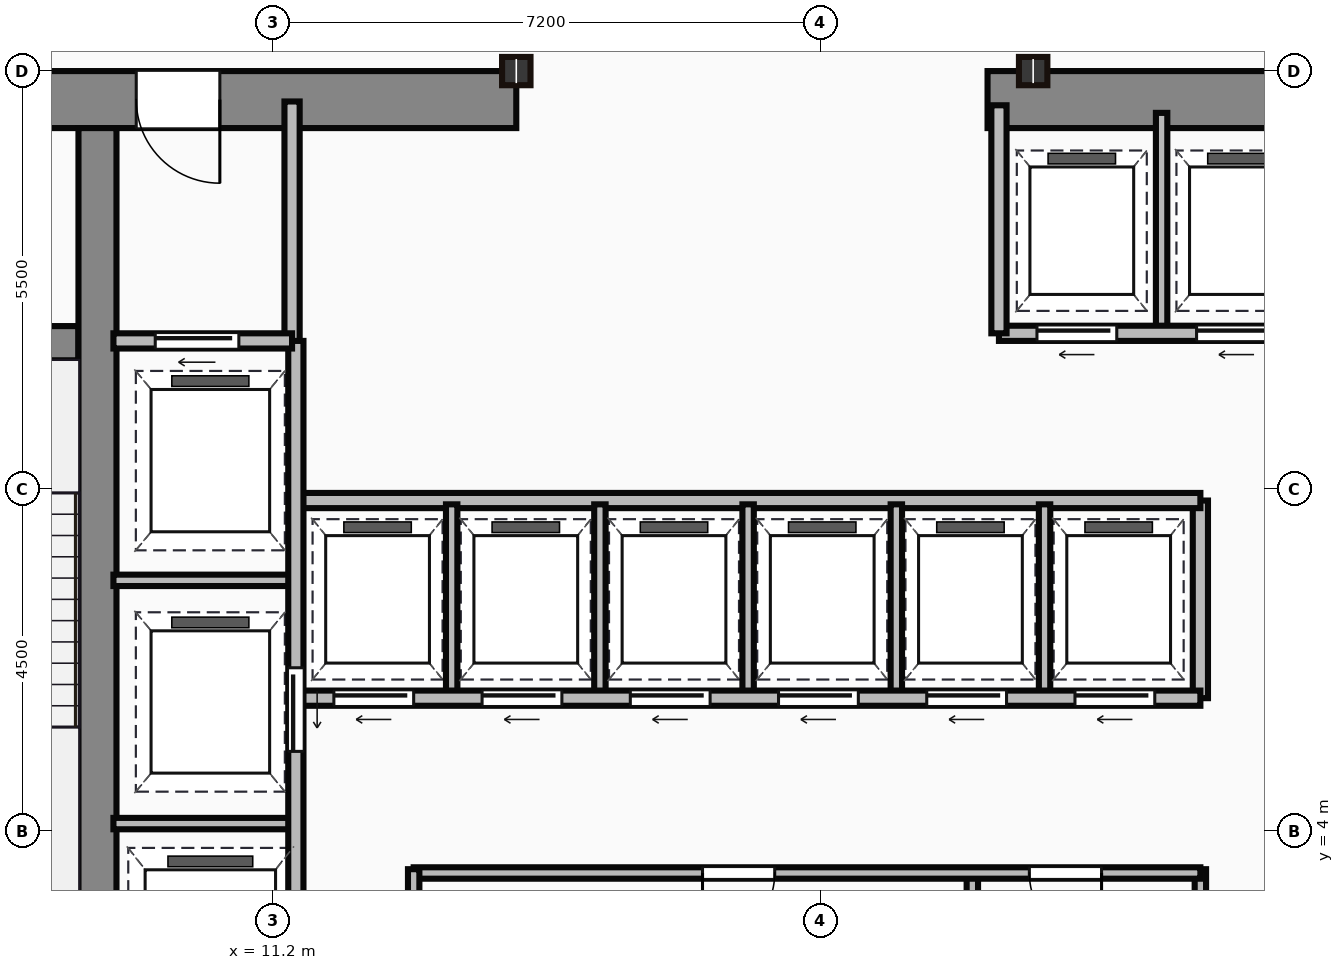
"""IFC4 building model, lengths in metres.
Left out: names, types, materials, properties, quantities, classifications, styles, units other than length and angle.
Written with IfcOpenShell. Run it as: python <this file> out.ifc"""

import sys

from ifc_helpers import new_model, si_unit, direction, frame, frame_2d, origin, origin_2d, place, context, subcontext, project, spatial, rectangle, i_section, extrude, source, transform, mapped, element, fill, save


model = new_model("IFC4")
c1 = context("Model", 3, precision=1e-05, world=origin(), true_north=direction((0.0, 1.0)))
c2 = subcontext(c1, "Body", "Model", "MODEL_VIEW")
j1 = project(units=[si_unit("LENGTHUNIT", "METRE"), si_unit("PLANEANGLEUNIT", "RADIAN")], contexts=[c1])
p1 = place(None, origin())
s1 = spatial("IfcSite", under=j1, at=p1, CompositionType="ELEMENT")
p2 = place(p1, origin())
s2 = spatial("IfcBuilding", under=s1, at=p2, CompositionType="ELEMENT")
p3 = place(p2, frame((0.0, 0.0, 184.4)))
s3 = spatial("IfcBuildingStorey", under=s2, at=p3, CompositionType="ELEMENT", Elevation=184.4)
m1 = source(origin(), c2, "Body", "SweptSolid", [
    extrude(rectangle(XDim=9.1, YDim=0.75, at=frame_2d((4.55, 0.0))), origin(), (0.0, 0.0, 1.0), 4.2),
])
p4 = place(p3, frame((5.3, 13.625, 0.0), z_axis=(0.0, 0.0, 1.0), x_axis=(1.0, 0.0, 0.0)))
e1 = element("IfcWall", 1, at=p4, inside=s3, PredefinedType="SHEAR", context=c2, shape_type="MappedRepresentation", body=[
    mapped(m1, transform((0.0, 0.0, 0.0))),
])
p5 = place(p4, frame((4.1, 0.0, 0.0)))
e2 = element("IfcOpeningElement", 2, at=p5, cuts=e1, PredefinedType="OPENING", context=c2, shape_type="SweptSolid", body=[
    extrude(rectangle(XDim=1.1, YDim=2.15, at=frame_2d((0.55, 1.075))), frame((0.0, 0.385, 0.0), z_axis=(0.0, -1.0, 0.0), x_axis=(1.0, 0.0, 0.0)), (0.0, 0.0, 1.0), 0.77),
])
m2 = source(origin(), c2, "Body", "SweptSolid", [
    extrude(rectangle(XDim=12.6, YDim=0.75, at=frame_2d((6.3, 0.0))), origin(), (0.0, 0.0, 1.0), 4.2),
])
p6 = place(p3, frame((20.6, 13.625, 0.0), z_axis=(0.0, 0.0, 1.0), x_axis=(1.0, 0.0, 0.0)))
e3 = element("IfcWall", 3, at=p6, inside=s3, PredefinedType="SHEAR", context=c2, shape_type="MappedRepresentation", body=[
    mapped(m2, transform((0.0, 0.0, 0.0))),
])
p7 = place(p6, frame((9.25, 0.0, 0.0)))
e4 = element("IfcOpeningElement", 4, at=p7, cuts=e3, PredefinedType="OPENING", context=c2, shape_type="SweptSolid", body=[
    extrude(rectangle(XDim=1.1, YDim=2.15, at=frame_2d((0.55, 1.075))), frame((0.0, 0.385, 0.0), z_axis=(0.0, -1.0, 0.0), x_axis=(1.0, 0.0, 0.0)), (0.0, 0.0, 1.0), 0.77),
])
m3 = source(origin(), c2, "Body", "SweptSolid", [
    extrude(rectangle(XDim=12.35, YDim=0.5, at=frame_2d((6.175, 0.0))), origin(), (0.0, 0.0, 1.0), 4.2),
])
p8 = place(p3, frame((8.89, 0.9, 0.0), z_axis=(0.0, 0.0, 1.0), x_axis=(0.0, 1.0, 0.0)))
e5 = element("IfcWall", 5, at=p8, inside=s3, PredefinedType="SHEAR", context=c2, shape_type="MappedRepresentation", body=[
    mapped(m3, transform((0.0, 0.0, 0.0))),
])
m4 = source(origin(), c2, "Body", "SweptSolid", [
    extrude(rectangle(XDim=3.39, YDim=0.45, at=frame_2d((1.695, 0.0))), origin(), (0.0, 0.0, 1.0), 4.2),
])
p9 = place(p3, frame((5.25, 10.42, 0.0), z_axis=(0.0, 0.0, 1.0), x_axis=(1.0, 0.0, 0.0)))
e6 = element("IfcWall", 6, at=p9, inside=s3, PredefinedType="SHEAR", context=c2, shape_type="MappedRepresentation", body=[
    mapped(m4, transform((0.0, 0.0, 0.0))),
])
p10 = place(p9, frame((1.05, 0.0, 0.0)))
e7 = element("IfcOpeningElement", 7, at=p10, cuts=e6, PredefinedType="OPENING", context=c2, shape_type="SweptSolid", body=[
    extrude(rectangle(XDim=1.1, YDim=2.15, at=frame_2d((0.55, 1.075))), frame((0.0, 0.235, 0.0), z_axis=(0.0, -1.0, 0.0), x_axis=(1.0, 0.0, 0.0)), (0.0, 0.0, 1.0), 0.47),
])
m5 = source(origin(), c2, "Body", "SweptSolid", [
    extrude(i_section(OverallWidth=0.374, OverallDepth=0.372, WebThickness=0.016, FlangeThickness=0.026, at=origin_2d()), origin(), (0.0, 0.0, 1.0), 4.2),
])
for number, where, z_axis, x_axis in (
    (8, (14.4, 14.0, 0.0), (0.0, 0.0, 1.0), (1.0, 0.0, 0.0)),
    (9, (21.2, 14.0, 0.0), (0.0, 0.0, 1.0), (1.0, 0.0, 0.0)),
):
    element("IfcColumn", number, at=place(p3, frame(where, z_axis=z_axis, x_axis=x_axis)), inside=s3, PredefinedType="COLUMN", context=c2, shape_type="MappedRepresentation", body=[
        mapped(m5, transform((0.0, 0.0, 0.0))),
    ])
m6 = source(origin(), c2, "Body", "SweptSolid", [
    extrude(rectangle(XDim=3.18, YDim=0.2, at=frame_2d((1.59, 0.0))), origin(), (0.0, 0.0, 1.0), 3.95),
])
p11 = place(p3, frame((11.45, 10.42, 0.0), z_axis=(0.0, 0.0, 1.0), x_axis=(0.0, 1.0, 0.0)))
e10 = element("IfcWall", 10, at=p11, inside=s3, PredefinedType="PARTITIONING", context=c2, shape_type="MappedRepresentation", body=[
    mapped(m6, transform((0.0, 0.0, 0.0))),
])
m7 = source(origin(), c2, "Body", "SweptSolid", [
    extrude(rectangle(XDim=2.35, YDim=0.2, at=frame_2d((1.175, 0.0))), origin(), (0.0, 0.0, 1.0), 3.95),
])
p12 = place(p3, frame((9.1, 10.45, 0.0), z_axis=(0.0, 0.0, 1.0), x_axis=(1.0, 0.0, 0.0)))
e11 = element("IfcWall", 11, at=p12, inside=s3, PredefinedType="PARTITIONING", context=c2, shape_type="MappedRepresentation", body=[
    mapped(m7, transform((0.0, 0.0, 0.0))),
])
p13 = place(p12, frame((0.55, 0.0, 0.0)))
e12 = element("IfcOpeningElement", 12, at=p13, cuts=e11, PredefinedType="OPENING", context=c2, shape_type="SweptSolid", body=[
    extrude(rectangle(XDim=1.1, YDim=2.15, at=frame_2d((0.55, 1.075))), frame((0.0, 0.11, 0.0), z_axis=(0.0, -1.0, 0.0), x_axis=(1.0, 0.0, 0.0)), (0.0, 0.0, 1.0), 0.22),
])
m8 = source(origin(), c2, "Body", "SweptSolid", [
    extrude(rectangle(XDim=9.6, YDim=0.2, at=frame_2d((4.8, 0.0))), origin(), (0.0, 0.0, 1.0), 3.95),
])
p14 = place(p3, frame((11.5, 0.85, 0.0), z_axis=(0.0, 0.0, 1.0), x_axis=(0.0, 1.0, 0.0)))
e13 = element("IfcWall", 13, at=p14, inside=s3, PredefinedType="PARTITIONING", context=c2, shape_type="MappedRepresentation", body=[
    mapped(m8, transform((0.0, 0.0, 0.0))),
])
p15 = place(p14, frame((4.2, 0.0, 0.0)))
e14 = element("IfcOpeningElement", 14, at=p15, cuts=e13, PredefinedType="OPENING", context=c2, shape_type="SweptSolid", body=[
    extrude(rectangle(XDim=1.1, YDim=2.15, at=frame_2d((0.55, 1.075))), frame((0.0, 0.11, 0.0), z_axis=(0.0, -1.0, 0.0), x_axis=(1.0, 0.0, 0.0)), (0.0, 0.0, 1.0), 0.22),
])
p16 = place(p14, frame((0.9, 0.0, 0.0)))
e15 = element("IfcOpeningElement", 15, at=p16, cuts=e13, PredefinedType="OPENING", context=c2, shape_type="SweptSolid", body=[
    extrude(rectangle(XDim=1.2, YDim=2.15, at=frame_2d((0.6, 1.075))), frame((0.0, 0.11, 0.0), z_axis=(0.0, -1.0, 0.0), x_axis=(1.0, 0.0, 0.0)), (0.0, 0.0, 1.0), 0.22),
])
m9 = source(origin(), c2, "Body", "SweptSolid", [
    extrude(rectangle(XDim=2.4, YDim=0.15, at=frame_2d((1.2, 0.0))), origin(), (0.0, 0.0, 1.0), 3.95),
])
for number, where, z_axis, x_axis in (
    (16, (9.1, 4.1, 0.0), (0.0, 0.0, 1.0), (1.0, 0.0, 0.0)),
    (17, (9.1, 7.3, 0.0), (0.0, 0.0, 1.0), (1.0, 0.0, 0.0)),
):
    element("IfcWall", number, at=place(p3, frame(where, z_axis=z_axis, x_axis=x_axis)), inside=s3, PredefinedType="PARTITIONING", context=c2, shape_type="MappedRepresentation", body=[
        mapped(m9, transform((0.0, 0.0, 0.0))),
    ])
m10 = source(origin(), c2, "Body", "SweptSolid", [
    extrude(rectangle(XDim=2.65, YDim=0.15, at=frame_2d((1.325, 0.0))), origin(), (0.0, 0.0, 1.0), 3.95),
])
p17 = place(p3, frame((13.05, 0.85, 0.0), z_axis=(0.0, 0.0, 1.0), x_axis=(0.0, 1.0, 0.0)))
e18 = element("IfcWall", 18, at=p17, inside=s3, PredefinedType="PARTITIONING", context=c2, shape_type="MappedRepresentation", body=[
    mapped(m10, transform((0.0, 0.0, 0.0))),
])
m11 = source(origin(), c2, "Body", "SweptSolid", [
    extrude(rectangle(XDim=10.35, YDim=0.15, at=frame_2d((5.175, 0.0))), origin(), (0.0, 0.0, 1.0), 3.95),
])
p18 = place(p3, frame((13.05, 3.45, 0.0), z_axis=(0.0, 0.0, 1.0), x_axis=(1.0, 0.0, 0.0)))
e19 = element("IfcWall", 19, at=p18, inside=s3, PredefinedType="PARTITIONING", context=c2, shape_type="MappedRepresentation", body=[
    mapped(m11, transform((0.0, 0.0, 0.0))),
])
p19 = place(p18, frame((3.8, 0.0, 0.0)))
e20 = element("IfcOpeningElement", 20, at=p19, cuts=e19, PredefinedType="OPENING", context=c2, shape_type="SweptSolid", body=[
    extrude(rectangle(XDim=0.95, YDim=2.15, at=frame_2d((0.475, 1.075))), frame((0.0, 0.085, 0.0), z_axis=(0.0, -1.0, 0.0), x_axis=(1.0, 0.0, 0.0)), (0.0, 0.0, 1.0), 0.17),
])
p20 = place(p18, frame((8.1, 0.0, 0.0)))
e21 = element("IfcOpeningElement", 21, at=p20, cuts=e19, PredefinedType="OPENING", context=c2, shape_type="SweptSolid", body=[
    extrude(rectangle(XDim=0.95, YDim=2.15, at=frame_2d((0.475, 1.075))), frame((0.0, 0.085, 0.0), z_axis=(0.0, -1.0, 0.0), x_axis=(1.0, 0.0, 0.0)), (0.0, 0.0, 1.0), 0.17),
])
p21 = place(p3, frame((23.4, 0.85, 0.0), z_axis=(0.0, 0.0, 1.0), x_axis=(0.0, 1.0, 0.0)))
e22 = element("IfcWall", 22, at=p21, inside=s3, PredefinedType="PARTITIONING", context=c2, shape_type="MappedRepresentation", body=[
    mapped(m10, transform((0.0, 0.0, 0.0))),
])
m12 = source(origin(), c2, "Body", "SweptSolid", [
    extrude(rectangle(XDim=2.6, YDim=0.15, at=frame_2d((1.3, 0.0))), origin(), (0.0, 0.0, 1.0), 3.95),
])
p22 = place(p3, frame((20.4, 0.85, 0.0), z_axis=(0.0, 0.0, 1.0), x_axis=(0.0, 1.0, 0.0)))
e23 = element("IfcWall", 23, at=p22, inside=s3, PredefinedType="PARTITIONING", context=c2, shape_type="MappedRepresentation", body=[
    mapped(m12, transform((0.0, 0.0, 0.0))),
])
m13 = source(origin(), c2, "Body", "SweptSolid", [
    extrude(rectangle(XDim=11.85, YDim=0.2, at=frame_2d((5.925, 0.0))), origin(), (0.0, 0.0, 1.0), 3.95),
])
p23 = place(p3, frame((11.55, 5.75, 0.0), z_axis=(0.0, 0.0, 1.0), x_axis=(1.0, 0.0, 0.0)))
e24 = element("IfcWall", 24, at=p23, inside=s3, PredefinedType="PARTITIONING", context=c2, shape_type="MappedRepresentation", body=[
    mapped(m13, transform((0.0, 0.0, 0.0))),
])
p24 = place(p23, frame((0.45, 0.0, 0.0)))
e25 = element("IfcOpeningElement", 25, at=p24, cuts=e24, PredefinedType="OPENING", context=c2, shape_type="SweptSolid", body=[
    extrude(rectangle(XDim=1.05, YDim=2.15, at=frame_2d((0.525, 1.075))), frame((0.0, 0.11, 0.0), z_axis=(0.0, -1.0, 0.0), x_axis=(1.0, 0.0, 0.0)), (0.0, 0.0, 1.0), 0.22),
])
p25 = place(p23, frame((2.4, 0.0, 0.0)))
e26 = element("IfcOpeningElement", 26, at=p25, cuts=e24, PredefinedType="OPENING", context=c2, shape_type="SweptSolid", body=[
    extrude(rectangle(XDim=1.05, YDim=2.15, at=frame_2d((0.525, 1.075))), frame((0.0, 0.11, 0.0), z_axis=(0.0, -1.0, 0.0), x_axis=(1.0, 0.0, 0.0)), (0.0, 0.0, 1.0), 0.22),
])
p26 = place(p23, frame((4.35, 0.0, 0.0)))
e27 = element("IfcOpeningElement", 27, at=p26, cuts=e24, PredefinedType="OPENING", context=c2, shape_type="SweptSolid", body=[
    extrude(rectangle(XDim=1.05, YDim=2.15, at=frame_2d((0.525, 1.075))), frame((0.0, 0.11, 0.0), z_axis=(0.0, -1.0, 0.0), x_axis=(1.0, 0.0, 0.0)), (0.0, 0.0, 1.0), 0.22),
])
p27 = place(p23, frame((6.3, 0.0, 0.0)))
e28 = element("IfcOpeningElement", 28, at=p27, cuts=e24, PredefinedType="OPENING", context=c2, shape_type="SweptSolid", body=[
    extrude(rectangle(XDim=1.05, YDim=2.15, at=frame_2d((0.525, 1.075))), frame((0.0, 0.11, 0.0), z_axis=(0.0, -1.0, 0.0), x_axis=(1.0, 0.0, 0.0)), (0.0, 0.0, 1.0), 0.22),
])
p28 = place(p23, frame((8.25, 0.0, 0.0)))
e29 = element("IfcOpeningElement", 29, at=p28, cuts=e24, PredefinedType="OPENING", context=c2, shape_type="SweptSolid", body=[
    extrude(rectangle(XDim=1.05, YDim=2.15, at=frame_2d((0.525, 1.075))), frame((0.0, 0.11, 0.0), z_axis=(0.0, -1.0, 0.0), x_axis=(1.0, 0.0, 0.0)), (0.0, 0.0, 1.0), 0.22),
])
p29 = place(p23, frame((10.2, 0.0, 0.0)))
e30 = element("IfcOpeningElement", 30, at=p29, cuts=e24, PredefinedType="OPENING", context=c2, shape_type="SweptSolid", body=[
    extrude(rectangle(XDim=1.05, YDim=2.15, at=frame_2d((0.525, 1.075))), frame((0.0, 0.11, 0.0), z_axis=(0.0, -1.0, 0.0), x_axis=(1.0, 0.0, 0.0)), (0.0, 0.0, 1.0), 0.22),
])
p30 = place(p3, frame((11.55, 8.35, 0.0), z_axis=(0.0, 0.0, 1.0), x_axis=(1.0, 0.0, 0.0)))
e31 = element("IfcWall", 31, at=p30, inside=s3, PredefinedType="PARTITIONING", context=c2, shape_type="MappedRepresentation", body=[
    mapped(m13, transform((0.0, 0.0, 0.0))),
])
m14 = source(origin(), c2, "Body", "SweptSolid", [
    extrude(rectangle(XDim=2.6, YDim=0.2, at=frame_2d((1.3, 0.0))), origin(), (0.0, 0.0, 1.0), 3.95),
])
p31 = place(p3, frame((23.4, 5.75, 0.0), z_axis=(0.0, 0.0, 1.0), x_axis=(0.0, 1.0, 0.0)))
e32 = element("IfcWall", 32, at=p31, inside=s3, PredefinedType="PARTITIONING", context=c2, shape_type="MappedRepresentation", body=[
    mapped(m14, transform((0.0, 0.0, 0.0))),
])
m15 = source(origin(), c2, "Body", "SweptSolid", [
    extrude(rectangle(XDim=2.5, YDim=0.15, at=frame_2d((1.25, 0.0))), origin(), (0.0, 0.0, 1.0), 3.95),
])
for number, where, z_axis, x_axis in (
    (33, (13.55, 5.8, 0.0), (0.0, 0.0, 1.0), (0.0, 1.0, 0.0)),
    (34, (15.5, 5.8, 0.0), (0.0, 0.0, 1.0), (0.0, 1.0, 0.0)),
    (35, (17.45, 5.8, 0.0), (0.0, 0.0, 1.0), (0.0, 1.0, 0.0)),
    (36, (19.4, 5.8, 0.0), (0.0, 0.0, 1.0), (0.0, 1.0, 0.0)),
    (37, (21.35, 5.8, 0.0), (0.0, 0.0, 1.0), (0.0, 1.0, 0.0)),
):
    element("IfcWall", number, at=place(p3, frame(where, z_axis=z_axis, x_axis=x_axis)), inside=s3, PredefinedType="PARTITIONING", context=c2, shape_type="MappedRepresentation", body=[
        mapped(m15, transform((0.0, 0.0, 0.0))),
    ])
m16 = source(origin(), c2, "Body", "SweptSolid", [
    extrude(rectangle(XDim=8.8, YDim=0.2, at=frame_2d((4.4, 0.0))), origin(), (0.0, 0.0, 1.0), 3.95),
])
p32 = place(p3, frame((20.75, 10.55, 0.0), z_axis=(0.0, 0.0, 1.0), x_axis=(1.0, 0.0, 0.0)))
e38 = element("IfcWall", 38, at=p32, inside=s3, PredefinedType="PARTITIONING", context=c2, shape_type="MappedRepresentation", body=[
    mapped(m16, transform((0.0, 0.0, 0.0))),
])
p33 = place(p32, frame((0.5, 0.0, 0.0)))
e39 = element("IfcOpeningElement", 39, at=p33, cuts=e38, PredefinedType="OPENING", context=c2, shape_type="SweptSolid", body=[
    extrude(rectangle(XDim=1.05, YDim=2.15, at=frame_2d((0.525, 1.075))), frame((0.0, 0.11, 0.0), z_axis=(0.0, -1.0, 0.0), x_axis=(1.0, 0.0, 0.0)), (0.0, 0.0, 1.0), 0.22),
])
p34 = place(p32, frame((2.6, 0.0, 0.0)))
e40 = element("IfcOpeningElement", 40, at=p34, cuts=e38, PredefinedType="OPENING", context=c2, shape_type="SweptSolid", body=[
    extrude(rectangle(XDim=1.05, YDim=2.15, at=frame_2d((0.525, 1.075))), frame((0.0, 0.11, 0.0), z_axis=(0.0, -1.0, 0.0), x_axis=(1.0, 0.0, 0.0)), (0.0, 0.0, 1.0), 0.22),
])
p35 = place(p32, frame((4.7, 0.0, 0.0)))
e41 = element("IfcOpeningElement", 41, at=p35, cuts=e38, PredefinedType="OPENING", context=c2, shape_type="SweptSolid", body=[
    extrude(rectangle(XDim=1.05, YDim=2.15, at=frame_2d((0.525, 1.075))), frame((0.0, 0.11, 0.0), z_axis=(0.0, -1.0, 0.0), x_axis=(1.0, 0.0, 0.0)), (0.0, 0.0, 1.0), 0.22),
])
p36 = place(p32, frame((6.8, 0.0, 0.0)))
e42 = element("IfcOpeningElement", 42, at=p36, cuts=e38, PredefinedType="OPENING", context=c2, shape_type="SweptSolid", body=[
    extrude(rectangle(XDim=1.05, YDim=2.15, at=frame_2d((0.525, 1.075))), frame((0.0, 0.11, 0.0), z_axis=(0.0, -1.0, 0.0), x_axis=(1.0, 0.0, 0.0)), (0.0, 0.0, 1.0), 0.22),
])
m17 = source(origin(), c2, "Body", "SweptSolid", [
    extrude(rectangle(XDim=3.0, YDim=0.2, at=frame_2d((1.5, 0.0))), origin(), (0.0, 0.0, 1.0), 3.95),
])
p37 = place(p3, frame((20.75, 10.55, 0.0), z_axis=(0.0, 0.0, 1.0), x_axis=(0.0, 1.0, 0.0)))
e43 = element("IfcWall", 43, at=p37, inside=s3, PredefinedType="PARTITIONING", context=c2, shape_type="MappedRepresentation", body=[
    mapped(m17, transform((0.0, 0.0, 0.0))),
])
m18 = source(origin(), c2, "Body", "SweptSolid", [
    extrude(rectangle(XDim=2.85, YDim=0.15, at=frame_2d((1.425, 0.0))), origin(), (0.0, 0.0, 1.0), 3.95),
])
p38 = place(p3, frame((22.89, 10.6, 0.0), z_axis=(0.0, 0.0, 1.0), x_axis=(0.0, 1.0, 0.0)))
e44 = element("IfcWall", 44, at=p38, inside=s3, PredefinedType="PARTITIONING", context=c2, shape_type="MappedRepresentation", body=[
    mapped(m18, transform((0.0, 0.0, 0.0))),
])
m19 = source(origin(), c2, "Body", "SweptSolid", [
    extrude(rectangle(XDim=1.1, YDim=2.15, at=frame_2d((0.55, 1.075))), frame((0.0, 0.025, 0.0), z_axis=(0.0, -1.0, 0.0), x_axis=(1.0, 0.0, 0.0)), (0.0, 0.0, 1.0), 0.05),
])
p39 = place(p5, origin())
e45 = element("IfcDoor", 45, at=p39, inside=s3, OperationType="SINGLE_SWING_RIGHT", PredefinedType="DOOR", context=c2, shape_type="MappedRepresentation", body=[
    mapped(m19, transform((0.0, 0.0, 0.0))),
])
fill(e2, e45)
p40 = place(p13, origin())
e46 = element("IfcDoor", 46, at=p40, inside=s3, OperationType="SLIDING_TO_LEFT", PredefinedType="DOOR", context=c2, shape_type="MappedRepresentation", body=[
    mapped(m19, transform((0.0, 0.0, 0.0))),
])
fill(e12, e46)
p41 = place(p15, frame((1.1, 0.0, 0.0), z_axis=(0.0, 0.0, 1.0), x_axis=(-1.0, 0.0, 0.0)))
e47 = element("IfcDoor", 47, at=p41, inside=s3, OperationType="SLIDING_TO_LEFT", PredefinedType="DOOR", context=c2, shape_type="MappedRepresentation", body=[
    mapped(m19, transform((0.0, 0.0, 0.0))),
])
fill(e14, e47)
m20 = source(origin(), c2, "Body", "SweptSolid", [
    extrude(rectangle(XDim=0.95, YDim=2.15, at=frame_2d((0.475, 1.075))), frame((0.0, 0.025, 0.0), z_axis=(0.0, -1.0, 0.0), x_axis=(1.0, 0.0, 0.0)), (0.0, 0.0, 1.0), 0.05),
])
p42 = place(p19, origin())
e48 = element("IfcDoor", 48, at=p42, inside=s3, OperationType="SINGLE_SWING_LEFT", PredefinedType="DOOR", context=c2, shape_type="MappedRepresentation", body=[
    mapped(m20, transform((0.0, 0.0, 0.0))),
])
fill(e20, e48)
p43 = place(p20, origin())
e49 = element("IfcDoor", 49, at=p43, inside=s3, OperationType="SINGLE_SWING_RIGHT", PredefinedType="DOOR", context=c2, shape_type="MappedRepresentation", body=[
    mapped(m20, transform((0.0, 0.0, 0.0))),
])
fill(e21, e49)
m21 = source(origin(), c2, "Body", "SweptSolid", [
    extrude(rectangle(XDim=1.05, YDim=2.15, at=frame_2d((0.525, 1.075))), frame((0.0, 0.025, 0.0), z_axis=(0.0, -1.0, 0.0), x_axis=(1.0, 0.0, 0.0)), (0.0, 0.0, 1.0), 0.05),
])
p44 = place(p24, frame((1.05, 0.0, 0.0), z_axis=(0.0, 0.0, 1.0), x_axis=(-1.0, 0.0, 0.0)))
e50 = element("IfcDoor", 50, at=p44, inside=s3, OperationType="SLIDING_TO_LEFT", PredefinedType="DOOR", context=c2, shape_type="MappedRepresentation", body=[
    mapped(m21, transform((0.0, 0.0, 0.0))),
])
fill(e25, e50)
p45 = place(p25, frame((1.05, 0.0, 0.0), z_axis=(0.0, 0.0, 1.0), x_axis=(-1.0, 0.0, 0.0)))
e51 = element("IfcDoor", 51, at=p45, inside=s3, OperationType="SLIDING_TO_LEFT", PredefinedType="DOOR", context=c2, shape_type="MappedRepresentation", body=[
    mapped(m21, transform((0.0, 0.0, 0.0))),
])
fill(e26, e51)
p46 = place(p26, frame((1.05, 0.0, 0.0), z_axis=(0.0, 0.0, 1.0), x_axis=(-1.0, 0.0, 0.0)))
e52 = element("IfcDoor", 52, at=p46, inside=s3, OperationType="SLIDING_TO_LEFT", PredefinedType="DOOR", context=c2, shape_type="MappedRepresentation", body=[
    mapped(m21, transform((0.0, 0.0, 0.0))),
])
fill(e27, e52)
p47 = place(p27, frame((1.05, 0.0, 0.0), z_axis=(0.0, 0.0, 1.0), x_axis=(-1.0, 0.0, 0.0)))
e53 = element("IfcDoor", 53, at=p47, inside=s3, OperationType="SLIDING_TO_LEFT", PredefinedType="DOOR", context=c2, shape_type="MappedRepresentation", body=[
    mapped(m21, transform((0.0, 0.0, 0.0))),
])
fill(e28, e53)
p48 = place(p28, frame((1.05, 0.0, 0.0), z_axis=(0.0, 0.0, 1.0), x_axis=(-1.0, 0.0, 0.0)))
e54 = element("IfcDoor", 54, at=p48, inside=s3, OperationType="SLIDING_TO_LEFT", PredefinedType="DOOR", context=c2, shape_type="MappedRepresentation", body=[
    mapped(m21, transform((0.0, 0.0, 0.0))),
])
fill(e29, e54)
p49 = place(p29, frame((1.05, 0.0, 0.0), z_axis=(0.0, 0.0, 1.0), x_axis=(-1.0, 0.0, 0.0)))
e55 = element("IfcDoor", 55, at=p49, inside=s3, OperationType="SLIDING_TO_LEFT", PredefinedType="DOOR", context=c2, shape_type="MappedRepresentation", body=[
    mapped(m21, transform((0.0, 0.0, 0.0))),
])
fill(e30, e55)
p50 = place(p33, frame((1.05, 0.0, 0.0), z_axis=(0.0, 0.0, 1.0), x_axis=(-1.0, 0.0, 0.0)))
e56 = element("IfcDoor", 56, at=p50, inside=s3, OperationType="SLIDING_TO_LEFT", PredefinedType="DOOR", context=c2, shape_type="MappedRepresentation", body=[
    mapped(m21, transform((0.0, 0.0, 0.0))),
])
fill(e39, e56)
p51 = place(p34, frame((1.05, 0.0, 0.0), z_axis=(0.0, 0.0, 1.0), x_axis=(-1.0, 0.0, 0.0)))
e57 = element("IfcDoor", 57, at=p51, inside=s3, OperationType="SLIDING_TO_LEFT", PredefinedType="DOOR", context=c2, shape_type="MappedRepresentation", body=[
    mapped(m21, transform((0.0, 0.0, 0.0))),
])
fill(e40, e57)
save(model, sys.argv[1])
